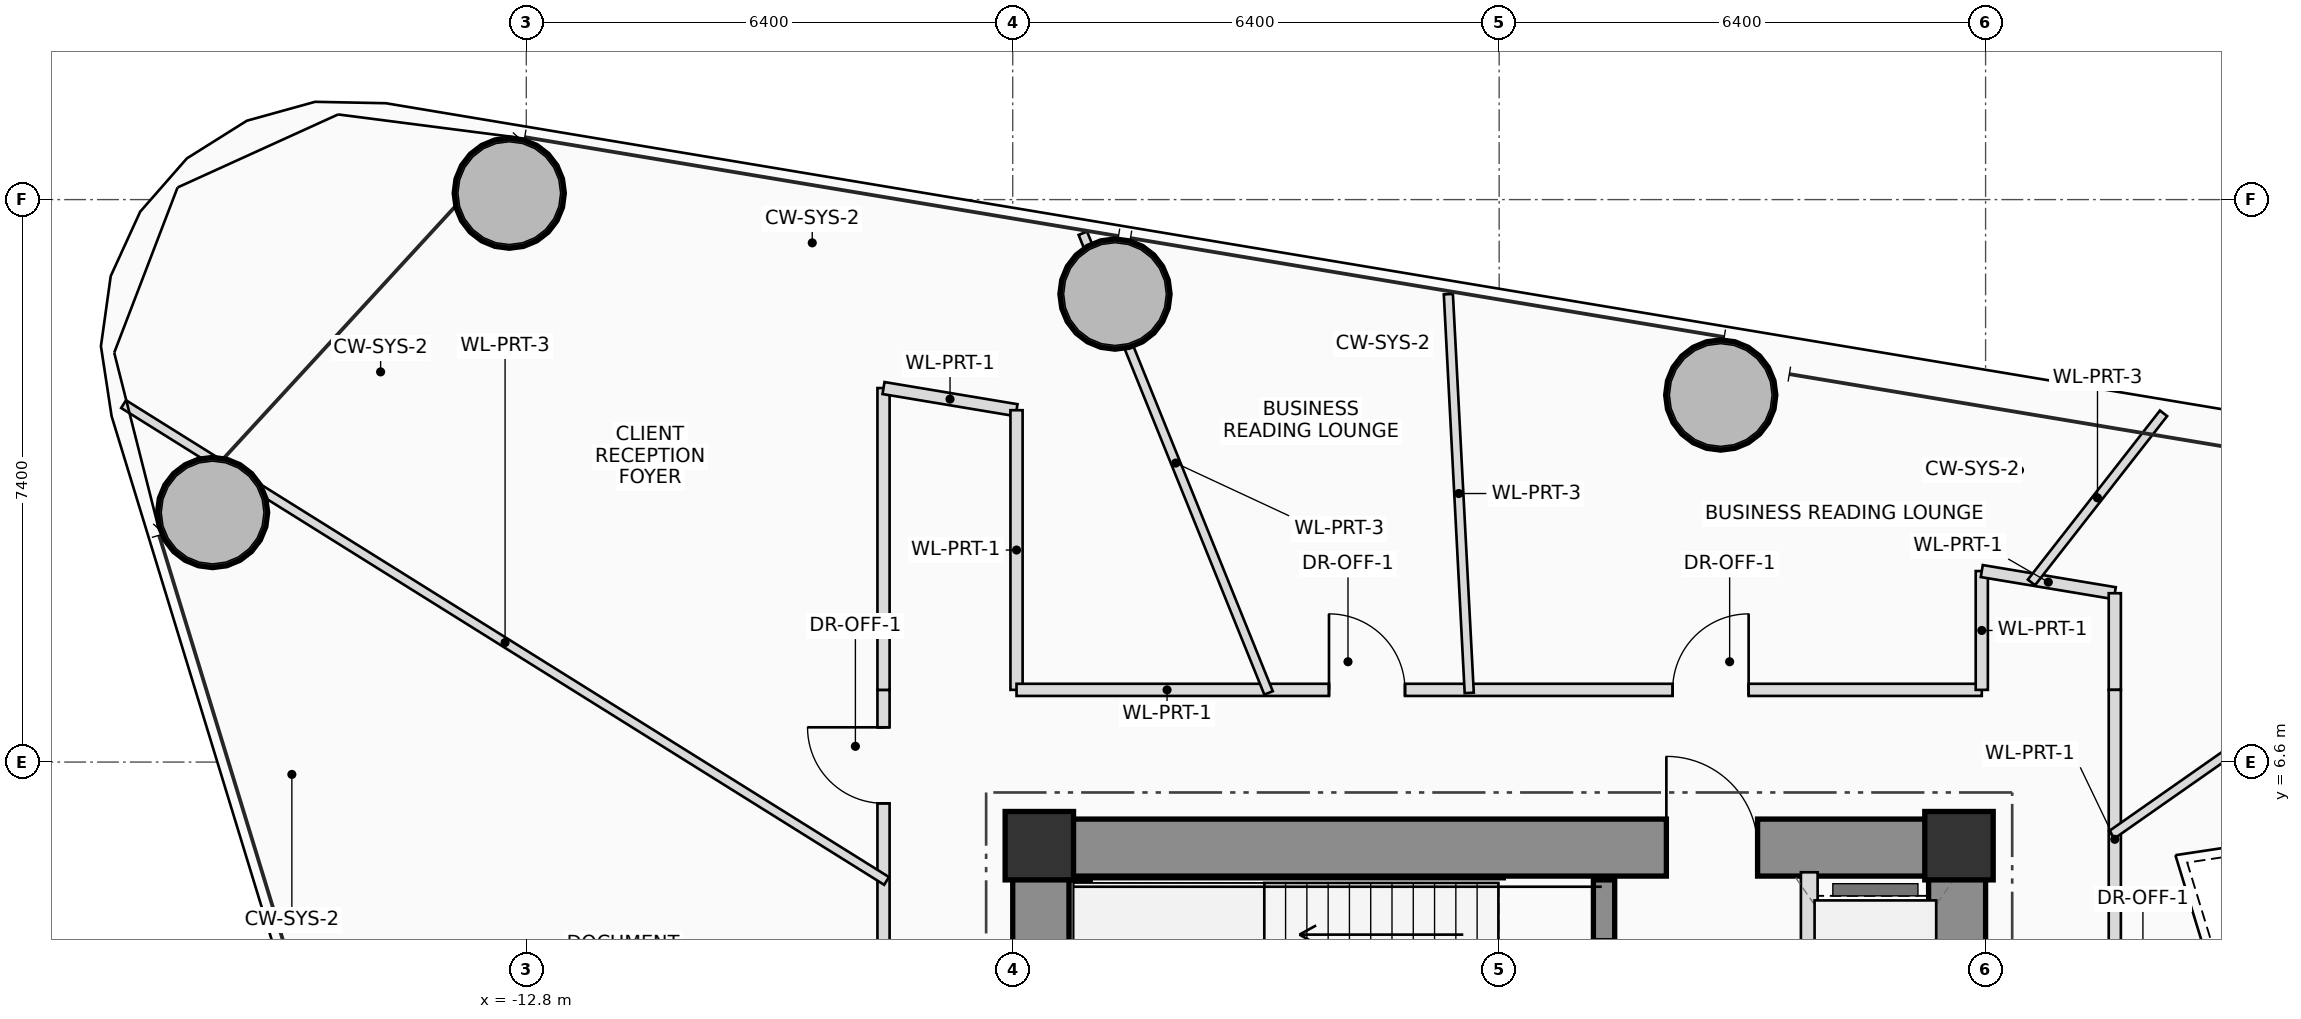
"""IFC4 building model, lengths in metres.
Left out: names, types, materials, properties, quantities, classifications, styles, units other than length and angle.
Written with IfcOpenShell. Run it as: python <this file> out.ifc"""

import sys

from ifc_helpers import new_model, si_unit, direction, frame, frame_2d, origin, origin_2d, place, context, subcontext, project, spatial, rectangle, hollow_circle, extrude, source, transform, mapped, element, fill, save


model = new_model("IFC4")
c1 = context("Model", 3, precision=1e-05, world=origin(), true_north=direction((0.0, 1.0)))
c2 = subcontext(c1, "Body", "Model", "MODEL_VIEW")
j1 = project(units=[si_unit("LENGTHUNIT", "METRE"), si_unit("PLANEANGLEUNIT", "RADIAN")], contexts=[c1])
p1 = place(None, origin())
s1 = spatial("IfcSite", under=j1, at=p1, CompositionType="ELEMENT")
p2 = place(p1, origin())
s2 = spatial("IfcBuilding", under=s1, at=p2, CompositionType="ELEMENT")
p3 = place(p2, frame((0.0, 0.0, 101.15)))
s3 = spatial("IfcBuildingStorey", under=s2, at=p3, CompositionType="ELEMENT", Elevation=101.15)
m1 = source(origin(), c2, "Body", "SweptSolid", [
    extrude(rectangle(XDim=0.9, YDim=0.9, at=origin_2d()), origin(), (0.0, 0.0, 1.0), 3.75),
])
for number, where, z_axis, x_axis in (
    (1, (6.05, 5.5, 0.0), (0.0, 0.0, 1.0), (1.0, 0.0, 0.0)),
    (2, (-6.05, 5.5, 0.0), (0.0, 0.0, 1.0), (1.0, 0.0, 0.0)),
):
    element("IfcColumn", number, at=place(p3, frame(where, z_axis=z_axis, x_axis=x_axis)), inside=s3, PredefinedType="COLUMN", context=c2, shape_type="MappedRepresentation", body=[
        mapped(m1, transform((0.0, 0.0, 0.0), scale=1.0)),
    ])
p4 = place(p3, frame((-6.4, 5.475, 0.0), z_axis=(0.0, 0.0, 1.0), x_axis=(1.0, 0.0, 0.0)))
e3 = element("IfcWall", 3, at=p4, inside=s3, PredefinedType="SHEAR", context=c2, shape_type="SweptSolid", body=[
    extrude(rectangle(XDim=12.8, YDim=0.75, at=frame_2d((6.4, 0.0))), origin(), (0.0, 0.0, 1.0), 3.75),
])
p5 = place(p4, frame((8.6, 0.0, 0.0)))
e4 = element("IfcOpeningElement", 4, at=p5, cuts=e3, PredefinedType="OPENING", context=c2, shape_type="SweptSolid", body=[
    extrude(rectangle(XDim=1.2, YDim=2.2, at=frame_2d((0.6, 1.1))), frame((0.0, 0.385, 0.0), z_axis=(0.0, -1.0, 0.0), x_axis=(1.0, 0.0, 0.0)), (0.0, 0.0, 1.0), 0.77),
])
p6 = place(p3, frame((6.025, -5.1, 0.0), z_axis=(0.0, 0.0, 1.0), x_axis=(0.0, 1.0, 0.0)))
e5 = element("IfcWall", 5, at=p6, inside=s3, PredefinedType="SHEAR", context=c2, shape_type="SweptSolid", body=[
    extrude(rectangle(XDim=10.2, YDim=0.75, at=frame_2d((5.1, 0.0))), origin(), (0.0, 0.0, 1.0), 3.75),
])
p7 = place(p3, frame((-6.025, 1.75, 0.0), z_axis=(0.0, 0.0, 1.0), x_axis=(0.0, 1.0, 0.0)))
e6 = element("IfcWall", 6, at=p7, inside=s3, PredefinedType="SHEAR", context=c2, shape_type="SweptSolid", body=[
    extrude(rectangle(XDim=3.35, YDim=0.75, at=frame_2d((1.675, 0.0))), origin(), (0.0, 0.0, 1.0), 3.75),
])
p8 = place(p3, frame((-5.52, 2.3, 0.0), z_axis=(0.0, 0.0, 1.0), x_axis=(0.0, 1.0, 0.0)))
e7 = element("IfcWall", 7, at=p8, inside=s3, PredefinedType="SHEAR", context=c2, shape_type="SweptSolid", body=[
    extrude(rectangle(XDim=2.75, YDim=0.28, at=frame_2d((1.375, 0.0))), origin(), (0.0, 0.0, 1.0), 3.75),
])
p9 = place(p3, frame((1.38, 4.25, 0.0), z_axis=(0.0, 0.0, 1.0), x_axis=(0.0, 1.0, 0.0)))
e8 = element("IfcWall", 8, at=p9, inside=s3, PredefinedType="SHEAR", context=c2, shape_type="SweptSolid", body=[
    extrude(rectangle(XDim=0.8, YDim=0.28, at=frame_2d((0.4, 0.0))), origin(), (0.0, 0.0, 1.0), 3.75),
])
m2 = source(origin(), c2, "Body", "SweptSolid", [
    extrude(hollow_circle(Radius=0.725, WallThickness=0.05, at=origin_2d()), origin(), (0.0, 0.0, 1.0), 3.75),
])
for number, where, z_axis, x_axis in (
    (9, (2.915, 11.429, 0.0), (0.0, 0.0, 1.0), (1.0, 0.0, 0.0)),
    (10, (-5.054, 12.757, 0.0), (0.0, 0.0, 1.0), (1.0, 0.0, 0.0)),
    (11, (-13.024, 14.085, 0.0), (0.0, 0.0, 1.0), (1.0, 0.0, 0.0)),
    (12, (-16.927, 9.883, 0.0), (0.0, 0.0, 1.0), (1.0, 0.0, 0.0)),
):
    element("IfcColumn", number, at=place(p3, frame(where, z_axis=z_axis, x_axis=x_axis)), inside=s3, PredefinedType="COLUMN", context=c2, shape_type="MappedRepresentation", body=[
        mapped(m2, transform((0.0, 0.0, 0.0), scale=1.0)),
    ])
p10 = place(p3, frame((4.08, 2.2, 0.0), z_axis=(0.0, 0.0, 1.0), x_axis=(0.0, 1.0, 0.0)))
e13 = element("IfcWall", 13, at=p10, inside=s3, PredefinedType="PLUMBINGWALL", context=c2, shape_type="SweptSolid", body=[
    extrude(rectangle(XDim=2.95, YDim=0.22, at=frame_2d((1.475, 0.0))), origin(), (0.0, 0.0, 1.0), 3.545),
])
p11 = place(p10, frame((0.75, 0.0, 0.0)))
e14 = element("IfcOpeningElement", 14, at=p11, cuts=e13, PredefinedType="OPENING", context=c2, shape_type="SweptSolid", body=[
    extrude(rectangle(XDim=1.2, YDim=2.25, at=frame_2d((0.6, 1.125))), frame((0.0, 0.12, 0.0), z_axis=(0.0, -1.0, 0.0), x_axis=(1.0, 0.0, 0.0)), (0.0, 0.0, 1.0), 0.24),
])
p12 = place(p3, frame((-8.1, -7.55, 0.0), z_axis=(0.0, 0.0, 1.0), x_axis=(0.0, 1.0, 0.0)))
e15 = element("IfcWall", 15, at=p12, inside=s3, PredefinedType="PARTITIONING", context=c2, shape_type="SweptSolid", body=[
    extrude(rectangle(XDim=15.1, YDim=0.16, at=frame_2d((7.55, 0.0))), origin(), (0.0, 0.0, 1.0), 2.85),
])
p13 = place(p12, frame((5.185, 0.0, 0.0)))
e16 = element("IfcOpeningElement", 16, at=p13, cuts=e15, PredefinedType="OPENING", context=c2, shape_type="SweptSolid", body=[
    extrude(rectangle(XDim=1.0, YDim=2.25, at=frame_2d((0.5, 1.125))), frame((0.0, 0.09, 0.0), z_axis=(0.0, -1.0, 0.0), x_axis=(1.0, 0.0, 0.0)), (0.0, 0.0, 1.0), 0.18),
])
p14 = place(p12, frame((9.39, 0.0, 0.0)))
e17 = element("IfcOpeningElement", 17, at=p14, cuts=e15, PredefinedType="OPENING", context=c2, shape_type="SweptSolid", body=[
    extrude(rectangle(XDim=1.0, YDim=2.25, at=frame_2d((0.5, 1.125))), frame((0.0, 0.09, 0.0), z_axis=(0.0, -1.0, 0.0), x_axis=(1.0, 0.0, 0.0)), (0.0, 0.0, 1.0), 0.18),
])
p15 = place(p12, frame((13.607, 0.0, 0.0)))
e18 = element("IfcOpeningElement", 18, at=p15, cuts=e15, PredefinedType="OPENING", context=c2, shape_type="SweptSolid", body=[
    extrude(rectangle(XDim=1.0, YDim=2.25, at=frame_2d((0.5, 1.125))), frame((0.0, 0.09, 0.0), z_axis=(0.0, -1.0, 0.0), x_axis=(1.0, 0.0, 0.0)), (0.0, 0.0, 1.0), 0.18),
])
p16 = place(p3, frame((-8.1, 7.55, 0.0), z_axis=(0.0, 0.0, 1.0), x_axis=(0.0, 1.0, 0.0)))
e19 = element("IfcWall", 19, at=p16, inside=s3, PredefinedType="PARTITIONING", context=c2, shape_type="SweptSolid", body=[
    extrude(rectangle(XDim=3.971, YDim=0.16, at=frame_2d((1.985, 0.0))), origin(), (0.0, 0.0, 1.0), 2.85),
])
p17 = place(p3, frame((-8.1, 11.521, 0.0), z_axis=(0.0, 0.0, 1.0), x_axis=(0.986408796856, -0.164309724253, 0.0)))
e20 = element("IfcWall", 20, at=p17, inside=s3, PredefinedType="PARTITIONING", context=c2, shape_type="SweptSolid", body=[
    extrude(rectangle(XDim=1.774, YDim=0.16, at=frame_2d((0.887, 0.0))), origin(), (0.0, 0.0, 1.0), 3.545),
])
p18 = place(p3, frame((-6.35, 11.229, 0.0), z_axis=(0.0, 0.0, 1.0), x_axis=(0.0, -1.0, 0.0)))
e21 = element("IfcWall", 21, at=p18, inside=s3, PredefinedType="PARTITIONING", context=c2, shape_type="SweptSolid", body=[
    extrude(rectangle(XDim=3.679, YDim=0.16, at=frame_2d((1.84, 0.0))), origin(), (0.0, 0.0, 1.0), 3.05),
])
p19 = place(p3, frame((-6.35, 7.55, 0.0), z_axis=(0.0, 0.0, 1.0), x_axis=(1.0, 0.0, 0.0)))
e22 = element("IfcWall", 22, at=p19, inside=s3, PredefinedType="PARTITIONING", context=c2, shape_type="SweptSolid", body=[
    extrude(rectangle(XDim=12.7, YDim=0.16, at=frame_2d((6.35, 0.0))), origin(), (0.0, 0.0, 1.0), 2.85),
])
p20 = place(p19, frame((4.111, 0.0, 0.0)))
e23 = element("IfcOpeningElement", 23, at=p20, cuts=e22, PredefinedType="OPENING", context=c2, shape_type="SweptSolid", body=[
    extrude(rectangle(XDim=1.0, YDim=2.25, at=frame_2d((0.5, 1.125))), frame((0.0, 0.09, 0.0), z_axis=(0.0, -1.0, 0.0), x_axis=(1.0, 0.0, 0.0)), (0.0, 0.0, 1.0), 0.18),
])
p21 = place(p19, frame((8.632, 0.0, 0.0)))
e24 = element("IfcOpeningElement", 24, at=p21, cuts=e22, PredefinedType="OPENING", context=c2, shape_type="SweptSolid", body=[
    extrude(rectangle(XDim=1.0, YDim=2.25, at=frame_2d((0.5, 1.125))), frame((0.0, 0.09, 0.0), z_axis=(0.0, -1.0, 0.0), x_axis=(1.0, 0.0, 0.0)), (0.0, 0.0, 1.0), 0.18),
])
p22 = place(p3, frame((6.35, 7.55, 0.0), z_axis=(0.0, 0.0, 1.0), x_axis=(0.0, 1.0, 0.0)))
e25 = element("IfcWall", 25, at=p22, inside=s3, PredefinedType="PARTITIONING", context=c2, shape_type="SweptSolid", body=[
    extrude(rectangle(XDim=1.563, YDim=0.16, at=frame_2d((0.781, 0.0))), origin(), (0.0, 0.0, 1.0), 3.05),
])
p23 = place(p3, frame((6.35, 9.113, 0.0), z_axis=(0.0, 0.0, 1.0), x_axis=(0.986386484459, -0.164443617317, 0.0)))
e26 = element("IfcWall", 26, at=p23, inside=s3, PredefinedType="PARTITIONING", context=c2, shape_type="SweptSolid", body=[
    extrude(rectangle(XDim=1.774, YDim=0.16, at=frame_2d((0.887, 0.0))), origin(), (0.0, 0.0, 1.0), 3.2),
])
p24 = place(p3, frame((8.1, 8.821, 0.0), z_axis=(0.0, 0.0, 1.0), x_axis=(0.0, -1.0, 0.0)))
e27 = element("IfcWall", 27, at=p24, inside=s3, PredefinedType="PARTITIONING", context=c2, shape_type="SweptSolid", body=[
    extrude(rectangle(XDim=1.271, YDim=0.16, at=frame_2d((0.636, 0.0))), origin(), (0.0, 0.0, 1.0), 2.85),
])
p25 = place(p3, frame((8.1, 7.55, 0.0), z_axis=(0.0, 0.0, 1.0), x_axis=(0.0, -1.0, 0.0)))
e28 = element("IfcWall", 28, at=p25, inside=s3, PredefinedType="PARTITIONING", context=c2, shape_type="SweptSolid", body=[
    extrude(rectangle(XDim=7.53, YDim=0.16, at=frame_2d((3.765, 0.0))), origin(), (0.0, 0.0, 1.0), 2.85),
])
p26 = place(p25, frame((4.082, 0.0, 0.0)))
e29 = element("IfcOpeningElement", 29, at=p26, cuts=e28, PredefinedType="OPENING", context=c2, shape_type="SweptSolid", body=[
    extrude(rectangle(XDim=1.0, YDim=2.25, at=frame_2d((0.5, 1.125))), frame((0.0, 0.09, 0.0), z_axis=(0.0, -1.0, 0.0), x_axis=(1.0, 0.0, 0.0)), (0.0, 0.0, 1.0), 0.18),
])
p27 = place(p3, frame((8.06, 5.644, 0.0), z_axis=(0.0, 0.0, 1.0), x_axis=(0.819162822725, 0.573561042841, 0.0)))
e30 = element("IfcWall", 30, at=p27, inside=s3, PredefinedType="PARTITIONING", context=c2, shape_type="SweptSolid", body=[
    extrude(rectangle(XDim=7.968, YDim=0.12, at=frame_2d((3.984, 0.0))), origin(), (0.0, 0.0, 1.0), 2.85),
])
p28 = place(p3, frame((7.003, 8.964, 0.0), z_axis=(0.0, 0.0, 1.0), x_axis=(0.615657467661, 0.788013884721, 0.0)))
e31 = element("IfcWall", 31, at=p28, inside=s3, PredefinedType="PARTITIONING", context=c2, shape_type="SweptSolid", body=[
    extrude(rectangle(XDim=2.823, YDim=0.12, at=frame_2d((1.412, 0.0))), origin(), (0.0, 0.0, 1.0), 3.01),
])
p29 = place(p3, frame((-0.394, 7.51, 0.0), z_axis=(0.0, 0.0, 1.0), x_axis=(-0.052329543677, 0.998629870802, 0.0)))
e32 = element("IfcWall", 32, at=p29, inside=s3, PredefinedType="PARTITIONING", context=c2, shape_type="SweptSolid", body=[
    extrude(rectangle(XDim=5.253, YDim=0.12, at=frame_2d((2.626, 0.0))), origin(), (0.0, 0.0, 1.0), 3.01),
])
p30 = place(p3, frame((-3.034, 7.51, 0.0), z_axis=(0.0, 0.0, 1.0), x_axis=(-0.37460229318, 0.927185591963, 0.0)))
e33 = element("IfcWall", 33, at=p30, inside=s3, PredefinedType="PARTITIONING", context=c2, shape_type="SweptSolid", body=[
    extrude(rectangle(XDim=6.522, YDim=0.12, at=frame_2d((3.261, 0.0))), origin(), (0.0, 0.0, 1.0), 3.05),
])
p31 = place(p3, frame((-8.06, 5.036, 0.0), z_axis=(0.0, 0.0, 1.0), x_axis=(-0.848040015969, 0.529932195016, 0.0)))
e34 = element("IfcWall", 34, at=p31, inside=s3, PredefinedType="PARTITIONING", context=c2, shape_type="SweptSolid", body=[
    extrude(rectangle(XDim=11.837, YDim=0.12, at=frame_2d((5.918, 0.0))), origin(), (0.0, 0.0, 1.0), 2.85),
])
p32 = place(p5, origin())
e35 = element("IfcDoor", 35, at=p32, inside=s3, OperationType="SINGLE_SWING_LEFT", PredefinedType="DOOR", context=c2, shape_type="SweptSolid", body=[
    extrude(rectangle(XDim=1.2, YDim=2.2, at=frame_2d((0.6, 1.1))), frame((0.0, 0.025, 0.0), z_axis=(0.0, -1.0, 0.0), x_axis=(1.0, 0.0, 0.0)), (0.0, 0.0, 1.0), 0.05),
])
fill(e4, e35)
p33 = place(p15, origin())
e36 = element("IfcDoor", 36, at=p33, inside=s3, OperationType="SINGLE_SWING_RIGHT", PredefinedType="DOOR", context=c2, shape_type="SweptSolid", body=[
    extrude(rectangle(XDim=1.0, YDim=2.25, at=frame_2d((0.5, 1.125))), frame((0.0, 0.025, 0.0), z_axis=(0.0, -1.0, 0.0), x_axis=(1.0, 0.0, 0.0)), (0.0, 0.0, 1.0), 0.05),
])
fill(e18, e36)
p34 = place(p20, origin())
e37 = element("IfcDoor", 37, at=p34, inside=s3, OperationType="SINGLE_SWING_LEFT", PredefinedType="DOOR", context=c2, shape_type="SweptSolid", body=[
    extrude(rectangle(XDim=1.0, YDim=2.25, at=frame_2d((0.5, 1.125))), frame((0.0, 0.025, 0.0), z_axis=(0.0, -1.0, 0.0), x_axis=(1.0, 0.0, 0.0)), (0.0, 0.0, 1.0), 0.05),
])
fill(e23, e37)
p35 = place(p21, origin())
e38 = element("IfcDoor", 38, at=p35, inside=s3, OperationType="SINGLE_SWING_RIGHT", PredefinedType="DOOR", context=c2, shape_type="SweptSolid", body=[
    extrude(rectangle(XDim=1.0, YDim=2.25, at=frame_2d((0.5, 1.125))), frame((0.0, 0.025, 0.0), z_axis=(0.0, -1.0, 0.0), x_axis=(1.0, 0.0, 0.0)), (0.0, 0.0, 1.0), 0.05),
])
fill(e24, e38)
save(model, sys.argv[1])
